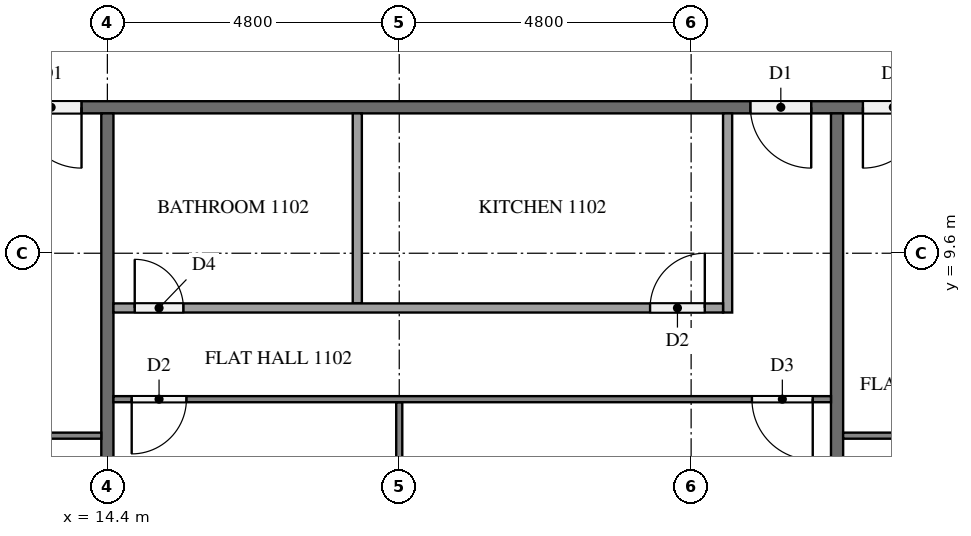
"""IFC4 building model, lengths in metres.
Left out: names, types, materials, properties, quantities, classifications, styles, units other than length and angle.
Written with IfcOpenShell. Run it as: python <this file> out.ifc"""

import sys

from ifc_helpers import new_model, si_unit, direction, frame, frame_2d, origin, place, context, subcontext, project, spatial, rectangle, extrude, element, fill, save


model = new_model("IFC4")
c1 = context("Model", 3, precision=1e-05, world=origin(), true_north=direction((0.0, 1.0)))
c2 = subcontext(c1, "Body", "Model", "MODEL_VIEW")
j1 = project(units=[si_unit("LENGTHUNIT", "METRE"), si_unit("PLANEANGLEUNIT", "RADIAN")], contexts=[c1])
p1 = place(None, origin())
s1 = spatial("IfcSite", under=j1, at=p1, CompositionType="ELEMENT")
p2 = place(p1, origin())
s2 = spatial("IfcBuilding", under=s1, at=p2, CompositionType="ELEMENT")
p3 = place(p2, frame((0.0, 0.0, 46.9)))
s3 = spatial("IfcBuildingStorey", under=s2, at=p3, CompositionType="ELEMENT", Elevation=46.9)
p4 = place(p3, frame((50.5, 12.0, 0.0), z_axis=(0.0, 0.0, 1.0), x_axis=(-1.0, 0.0, 0.0)))
e1 = element("IfcWall", 1, at=p4, inside=s3, PredefinedType="PARTITIONING", context=c2, shape_type="SweptSolid", body=[
    extrude(rectangle(XDim=38.6, YDim=0.2, at=frame_2d((19.3, 0.0))), origin(), (0.0, 0.0, 1.0), 3.2),
])
p5 = place(p4, frame((36.525, 0.0, 0.0)))
e2 = element("IfcOpeningElement", 2, at=p5, cuts=e1, PredefinedType="OPENING", context=c2, shape_type="SweptSolid", body=[
    extrude(rectangle(XDim=1.0, YDim=2.1, at=frame_2d((0.5, 1.05))), frame((0.0, 0.11, 0.0), z_axis=(0.0, -1.0, 0.0), x_axis=(1.0, 0.0, 0.0)), (0.0, 0.0, 1.0), 0.22),
])
p6 = place(p4, frame((24.525, 0.0, 0.0)))
e3 = element("IfcOpeningElement", 3, at=p6, cuts=e1, PredefinedType="OPENING", context=c2, shape_type="SweptSolid", body=[
    extrude(rectangle(XDim=1.0, YDim=2.1, at=frame_2d((0.5, 1.05))), frame((0.0, 0.11, 0.0), z_axis=(0.0, -1.0, 0.0), x_axis=(1.0, 0.0, 0.0)), (0.0, 0.0, 1.0), 0.22),
])
p7 = place(p4, frame((22.675, 0.0, 0.0)))
e4 = element("IfcOpeningElement", 4, at=p7, cuts=e1, PredefinedType="OPENING", context=c2, shape_type="SweptSolid", body=[
    extrude(rectangle(XDim=1.0, YDim=2.1, at=frame_2d((0.5, 1.05))), frame((0.0, 0.11, 0.0), z_axis=(0.0, -1.0, 0.0), x_axis=(1.0, 0.0, 0.0)), (0.0, 0.0, 1.0), 0.22),
])
p8 = place(p4, frame((8.275, 0.0, 0.0)))
e5 = element("IfcOpeningElement", 5, at=p8, cuts=e1, PredefinedType="OPENING", context=c2, shape_type="SweptSolid", body=[
    extrude(rectangle(XDim=1.0, YDim=2.1, at=frame_2d((0.5, 1.05))), frame((0.0, 0.11, 0.0), z_axis=(0.0, -1.0, 0.0), x_axis=(1.0, 0.0, 0.0)), (0.0, 0.0, 1.0), 0.22),
])
p9 = place(p3, frame((14.4, 11.9, 0.0), z_axis=(0.0, 0.0, 1.0), x_axis=(0.0, -1.0, 0.0)))
e6 = element("IfcWall", 6, at=p9, inside=s3, PredefinedType="PARTITIONING", context=c2, shape_type="SweptSolid", body=[
    extrude(rectangle(XDim=11.45, YDim=0.2, at=frame_2d((5.725, 0.0))), origin(), (0.0, 0.0, 1.0), 3.2),
])
p10 = place(p3, frame((26.4, 11.9, 0.0), z_axis=(0.0, 0.0, 1.0), x_axis=(0.0, -1.0, 0.0)))
e7 = element("IfcWall", 7, at=p10, inside=s3, PredefinedType="PARTITIONING", context=c2, shape_type="SweptSolid", body=[
    extrude(rectangle(XDim=11.8, YDim=0.2, at=frame_2d((5.9, 0.0))), origin(), (0.0, 0.0, 1.0), 3.2),
])
p11 = place(p3, frame((14.3, 6.6, 0.0), z_axis=(0.0, 0.0, 1.0), x_axis=(-1.0, 0.0, 0.0)))
e8 = element("IfcWall", 8, at=p11, inside=s3, PredefinedType="PARTITIONING", context=c2, shape_type="SweptSolid", body=[
    extrude(rectangle(XDim=14.2, YDim=0.1, at=frame_2d((7.1, 0.0))), origin(), (0.0, 0.0, 1.0), 3.2),
])
p12 = place(p11, frame((3.45, 0.0, 0.0)))
e9 = element("IfcOpeningElement", 9, at=p12, cuts=e8, PredefinedType="OPENING", context=c2, shape_type="SweptSolid", body=[
    extrude(rectangle(XDim=0.9, YDim=2.1, at=frame_2d((0.45, 1.05))), frame((0.0, 0.06, 0.0), z_axis=(0.0, -1.0, 0.0), x_axis=(1.0, 0.0, 0.0)), (0.0, 0.0, 1.0), 0.12),
])
p13 = place(p11, frame((5.05, 0.0, 0.0)))
e10 = element("IfcOpeningElement", 10, at=p13, cuts=e8, PredefinedType="OPENING", context=c2, shape_type="SweptSolid", body=[
    extrude(rectangle(XDim=1.0, YDim=2.1, at=frame_2d((0.5, 1.05))), frame((0.0, 0.06, 0.0), z_axis=(0.0, -1.0, 0.0), x_axis=(1.0, 0.0, 0.0)), (0.0, 0.0, 1.0), 0.12),
])
p14 = place(p11, frame((12.7, 0.0, 0.0)))
e11 = element("IfcOpeningElement", 11, at=p14, cuts=e8, PredefinedType="OPENING", context=c2, shape_type="SweptSolid", body=[
    extrude(rectangle(XDim=0.9, YDim=2.1, at=frame_2d((0.45, 1.05))), frame((0.0, 0.06, 0.0), z_axis=(0.0, -1.0, 0.0), x_axis=(1.0, 0.0, 0.0)), (0.0, 0.0, 1.0), 0.12),
])
p15 = place(p3, frame((19.2, 7.15, 0.0), z_axis=(0.0, 0.0, 1.0), x_axis=(0.0, -1.0, 0.0)))
e12 = element("IfcWall", 12, at=p15, inside=s3, PredefinedType="PARTITIONING", context=c2, shape_type="SweptSolid", body=[
    extrude(rectangle(XDim=7.05, YDim=0.1, at=frame_2d((3.525, 0.0))), origin(), (0.0, 0.0, 1.0), 3.2),
])
p16 = place(p3, frame((26.3, 7.2, 0.0), z_axis=(0.0, 0.0, 1.0), x_axis=(-1.0, 0.0, 0.0)))
e13 = element("IfcWall", 13, at=p16, inside=s3, PredefinedType="PARTITIONING", context=c2, shape_type="SweptSolid", body=[
    extrude(rectangle(XDim=11.8, YDim=0.1, at=frame_2d((5.9, 0.0))), origin(), (0.0, 0.0, 1.0), 3.2),
])
p17 = place(p16, frame((0.3, 0.0, 0.0)))
e14 = element("IfcOpeningElement", 14, at=p17, cuts=e13, PredefinedType="OPENING", context=c2, shape_type="SweptSolid", body=[
    extrude(rectangle(XDim=1.0, YDim=2.1, at=frame_2d((0.5, 1.05))), frame((0.0, 0.06, 0.0), z_axis=(0.0, -1.0, 0.0), x_axis=(1.0, 0.0, 0.0)), (0.0, 0.0, 1.0), 0.12),
])
p18 = place(p16, frame((10.6, 0.0, 0.0)))
e15 = element("IfcOpeningElement", 15, at=p18, cuts=e13, PredefinedType="OPENING", context=c2, shape_type="SweptSolid", body=[
    extrude(rectangle(XDim=0.9, YDim=2.1, at=frame_2d((0.45, 1.05))), frame((0.0, 0.06, 0.0), z_axis=(0.0, -1.0, 0.0), x_axis=(1.0, 0.0, 0.0)), (0.0, 0.0, 1.0), 0.12),
])
p19 = place(p3, frame((18.51, 11.9, 0.0), z_axis=(0.0, 0.0, 1.0), x_axis=(0.0, -1.0, 0.0)))
e16 = element("IfcWall", 16, at=p19, inside=s3, PredefinedType="PARTITIONING", context=c2, shape_type="SweptSolid", body=[
    extrude(rectangle(XDim=3.125, YDim=0.15, at=frame_2d((1.562, 0.0))), origin(), (0.0, 0.0, 1.0), 3.2),
])
p20 = place(p3, frame((24.6, 11.9, 0.0), z_axis=(0.0, 0.0, 1.0), x_axis=(0.0, -1.0, 0.0)))
e17 = element("IfcWall", 17, at=p20, inside=s3, PredefinedType="PARTITIONING", context=c2, shape_type="SweptSolid", body=[
    extrude(rectangle(XDim=3.275, YDim=0.15, at=frame_2d((1.637, 0.0))), origin(), (0.0, 0.0, 1.0), 3.2),
])
p21 = place(p3, frame((14.5, 8.7, 0.0), z_axis=(0.0, 0.0, 1.0), x_axis=(1.0, 0.0, 0.0)))
e18 = element("IfcWall", 18, at=p21, inside=s3, PredefinedType="PARTITIONING", context=c2, shape_type="SweptSolid", body=[
    extrude(rectangle(XDim=10.025, YDim=0.15, at=frame_2d((5.012, 0.0))), origin(), (0.0, 0.0, 1.0), 3.2),
])
p22 = place(p21, frame((8.825, 0.0, 0.0)))
e19 = element("IfcOpeningElement", 19, at=p22, cuts=e18, PredefinedType="OPENING", context=c2, shape_type="SweptSolid", body=[
    extrude(rectangle(XDim=0.9, YDim=2.1, at=frame_2d((0.45, 1.05))), frame((0.0, 0.085, 0.0), z_axis=(0.0, -1.0, 0.0), x_axis=(1.0, 0.0, 0.0)), (0.0, 0.0, 1.0), 0.17),
])
p23 = place(p21, frame((0.35, 0.0, 0.0)))
e20 = element("IfcOpeningElement", 20, at=p23, cuts=e18, PredefinedType="OPENING", context=c2, shape_type="SweptSolid", body=[
    extrude(rectangle(XDim=0.8, YDim=2.1, at=frame_2d((0.4, 1.05))), frame((0.0, 0.085, 0.0), z_axis=(0.0, -1.0, 0.0), x_axis=(1.0, 0.0, 0.0)), (0.0, 0.0, 1.0), 0.17),
])
p24 = place(p3, frame((40.7, 6.6, 0.0), z_axis=(0.0, 0.0, 1.0), x_axis=(-1.0, 0.0, 0.0)))
e21 = element("IfcWall", 21, at=p24, inside=s3, PredefinedType="PARTITIONING", context=c2, shape_type="SweptSolid", body=[
    extrude(rectangle(XDim=14.2, YDim=0.1, at=frame_2d((7.1, 0.0))), origin(), (0.0, 0.0, 1.0), 3.2),
])
p25 = place(p24, frame((9.85, 0.0, 0.0)))
e22 = element("IfcOpeningElement", 22, at=p25, cuts=e21, PredefinedType="OPENING", context=c2, shape_type="SweptSolid", body=[
    extrude(rectangle(XDim=0.9, YDim=2.1, at=frame_2d((0.45, 1.05))), frame((0.0, 0.06, 0.0), z_axis=(0.0, -1.0, 0.0), x_axis=(1.0, 0.0, 0.0)), (0.0, 0.0, 1.0), 0.12),
])
p26 = place(p24, frame((8.25, 0.0, 0.0)))
e23 = element("IfcOpeningElement", 23, at=p26, cuts=e21, PredefinedType="OPENING", context=c2, shape_type="SweptSolid", body=[
    extrude(rectangle(XDim=0.9, YDim=2.1, at=frame_2d((0.45, 1.05))), frame((0.0, 0.06, 0.0), z_axis=(0.0, -1.0, 0.0), x_axis=(1.0, 0.0, 0.0)), (0.0, 0.0, 1.0), 0.12),
])
p27 = place(p24, frame((0.3, 0.0, 0.0)))
e24 = element("IfcOpeningElement", 24, at=p27, cuts=e21, PredefinedType="OPENING", context=c2, shape_type="SweptSolid", body=[
    extrude(rectangle(XDim=1.0, YDim=2.1, at=frame_2d((0.5, 1.05))), frame((0.0, 0.06, 0.0), z_axis=(0.0, -1.0, 0.0), x_axis=(1.0, 0.0, 0.0)), (0.0, 0.0, 1.0), 0.12),
])
p28 = place(p5, origin())
e25 = element("IfcDoor", 25, at=p28, inside=s3, OperationType="SINGLE_SWING_LEFT", PredefinedType="DOOR", context=c2, shape_type="SweptSolid", body=[
    extrude(rectangle(XDim=1.0, YDim=2.1, at=frame_2d((0.5, 1.05))), frame((0.0, 0.025, 0.0), z_axis=(0.0, -1.0, 0.0), x_axis=(1.0, 0.0, 0.0)), (0.0, 0.0, 1.0), 0.05),
])
fill(e2, e25)
p29 = place(p6, origin())
e26 = element("IfcDoor", 26, at=p29, inside=s3, OperationType="SINGLE_SWING_LEFT", PredefinedType="DOOR", context=c2, shape_type="SweptSolid", body=[
    extrude(rectangle(XDim=1.0, YDim=2.1, at=frame_2d((0.5, 1.05))), frame((0.0, 0.025, 0.0), z_axis=(0.0, -1.0, 0.0), x_axis=(1.0, 0.0, 0.0)), (0.0, 0.0, 1.0), 0.05),
])
fill(e3, e26)
p30 = place(p7, origin())
e27 = element("IfcDoor", 27, at=p30, inside=s3, OperationType="SINGLE_SWING_RIGHT", PredefinedType="DOOR", context=c2, shape_type="SweptSolid", body=[
    extrude(rectangle(XDim=1.0, YDim=2.1, at=frame_2d((0.5, 1.05))), frame((0.0, 0.025, 0.0), z_axis=(0.0, -1.0, 0.0), x_axis=(1.0, 0.0, 0.0)), (0.0, 0.0, 1.0), 0.05),
])
fill(e4, e27)
p31 = place(p17, origin())
e28 = element("IfcDoor", 28, at=p31, inside=s3, OperationType="SINGLE_SWING_LEFT", PredefinedType="DOOR", context=c2, shape_type="SweptSolid", body=[
    extrude(rectangle(XDim=1.0, YDim=2.1, at=frame_2d((0.5, 1.05))), frame((0.0, 0.025, 0.0), z_axis=(0.0, -1.0, 0.0), x_axis=(1.0, 0.0, 0.0)), (0.0, 0.0, 1.0), 0.05),
])
fill(e14, e28)
p32 = place(p18, origin())
e29 = element("IfcDoor", 29, at=p32, inside=s3, OperationType="SINGLE_SWING_RIGHT", PredefinedType="DOOR", context=c2, shape_type="SweptSolid", body=[
    extrude(rectangle(XDim=0.9, YDim=2.1, at=frame_2d((0.45, 1.05))), frame((0.0, 0.025, 0.0), z_axis=(0.0, -1.0, 0.0), x_axis=(1.0, 0.0, 0.0)), (0.0, 0.0, 1.0), 0.05),
])
fill(e15, e29)
p33 = place(p22, origin())
e30 = element("IfcDoor", 30, at=p33, inside=s3, OperationType="SINGLE_SWING_RIGHT", PredefinedType="DOOR", context=c2, shape_type="SweptSolid", body=[
    extrude(rectangle(XDim=0.9, YDim=2.1, at=frame_2d((0.45, 1.05))), frame((0.0, 0.025, 0.0), z_axis=(0.0, -1.0, 0.0), x_axis=(1.0, 0.0, 0.0)), (0.0, 0.0, 1.0), 0.05),
])
fill(e19, e30)
p34 = place(p23, origin())
e31 = element("IfcDoor", 31, at=p34, inside=s3, OperationType="SINGLE_SWING_LEFT", PredefinedType="DOOR", context=c2, shape_type="SweptSolid", body=[
    extrude(rectangle(XDim=0.8, YDim=2.1, at=frame_2d((0.4, 1.05))), frame((0.0, 0.025, 0.0), z_axis=(0.0, -1.0, 0.0), x_axis=(1.0, 0.0, 0.0)), (0.0, 0.0, 1.0), 0.05),
])
fill(e20, e31)
save(model, sys.argv[1])
